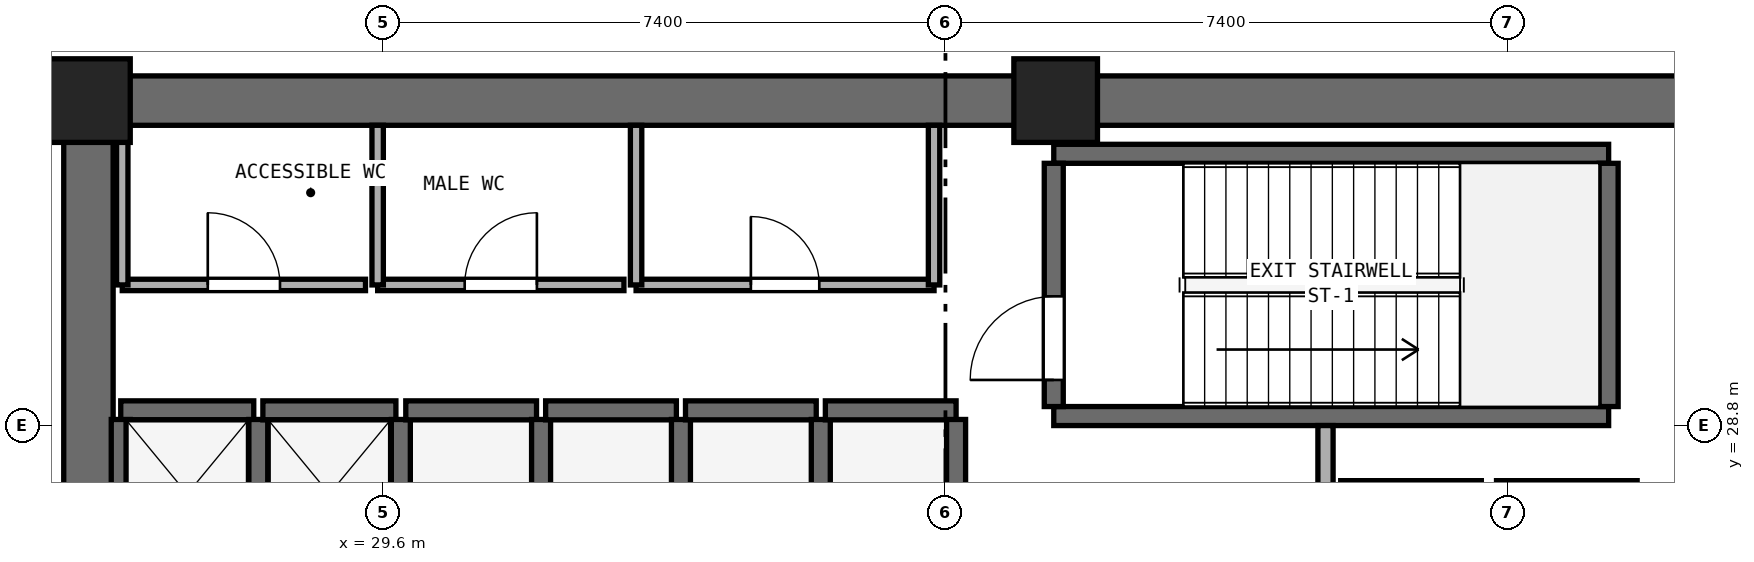
"""IFC4 building model, lengths in metres.
Left out: names, types, materials, properties, quantities, classifications, styles, units other than length and angle.
Written with IfcOpenShell. Run it as: python <this file> out.ifc"""

import sys

from ifc_helpers import new_model, si_unit, direction, frame, frame_2d, origin, origin_2d, place, context, subcontext, project, spatial, rectangle, extrude, element, fill, save


model = new_model("IFC4")
c1 = context("Model", 3, precision=1e-05, world=origin(), true_north=direction((0.0, 1.0)))
c2 = subcontext(c1, "Body", "Model", "MODEL_VIEW")
j1 = project(units=[si_unit("LENGTHUNIT", "METRE"), si_unit("PLANEANGLEUNIT", "RADIAN")], contexts=[c1])
p1 = place(None, origin())
s1 = spatial("IfcSite", under=j1, at=p1, CompositionType="ELEMENT")
p2 = place(p1, origin())
s2 = spatial("IfcBuilding", under=s1, at=p2, CompositionType="ELEMENT")
p3 = place(p2, frame((0.0, 0.0, 10.0)))
s3 = spatial("IfcBuildingStorey", under=s2, at=p3, CompositionType="ELEMENT", Elevation=10.0)
p4 = place(p3, frame((25.4, 33.075, 0.0), z_axis=(0.0, 0.0, 1.0), x_axis=(1.0, 0.0, 0.0)))
e1 = element("IfcWall", 1, at=p4, inside=s3, PredefinedType="SHEAR", context=c2, shape_type="SweptSolid", body=[
    extrude(rectangle(XDim=23.2, YDim=0.65, at=frame_2d((11.6, 0.0))), origin(), (0.0, 0.0, 1.0), 4.68),
])
p5 = place(p3, frame((25.725, 17.65, 0.0), z_axis=(0.0, 0.0, 1.0), x_axis=(0.0, 1.0, 0.0)))
e2 = element("IfcWall", 2, at=p5, inside=s3, PredefinedType="SHEAR", context=c2, shape_type="SweptSolid", body=[
    extrude(rectangle(XDim=15.1, YDim=0.65, at=frame_2d((7.55, 0.0))), origin(), (0.0, 0.0, 1.0), 4.68),
])
p6 = place(p5, frame((6.8, 0.0, 0.0)))
e3 = element("IfcOpeningElement", 3, at=p6, cuts=e2, PredefinedType="OPENING", context=c2, shape_type="SweptSolid", body=[
    extrude(rectangle(XDim=1.5, YDim=2.15, at=frame_2d((0.75, 1.075))), frame((0.0, 0.335, 0.0), z_axis=(0.0, -1.0, 0.0), x_axis=(1.0, 0.0, 0.0)), (0.0, 0.0, 1.0), 0.67),
])
for number, where, z_axis, x_axis in (
    (4, (38.45, 33.075, 0.0), (0.0, 0.0, 1.0), (1.0, 0.0, 0.0)),
    (5, (25.725, 33.075, 0.0), (0.0, 0.0, 1.0), (1.0, 0.0, 0.0)),
):
    element("IfcColumn", number, at=place(p3, frame(where, z_axis=z_axis, x_axis=x_axis)), inside=s3, PredefinedType="PILASTER", context=c2, shape_type="SweptSolid", body=[
        extrude(rectangle(XDim=1.1, YDim=1.1, at=origin_2d()), origin(), (0.0, 0.0, 1.0), 5.0),
    ])
for number, where, z_axis, x_axis in (
    (6, (38.425, 28.925, 0.0), (0.0, 0.0, 1.0), (1.0, 0.0, 0.0)),
    (7, (38.425, 32.375, 0.0), (0.0, 0.0, 1.0), (1.0, 0.0, 0.0)),
):
    element("IfcWall", number, at=place(p3, frame(where, z_axis=z_axis, x_axis=x_axis)), inside=s3, PredefinedType="SHEAR", context=c2, shape_type="SweptSolid", body=[
        extrude(rectangle(XDim=7.3, YDim=0.25, at=frame_2d((3.65, 0.0))), origin(), (0.0, 0.0, 1.0), 4.68),
    ])
p7 = place(p3, frame((38.425, 29.05, 0.0), z_axis=(0.0, 0.0, 1.0), x_axis=(0.0, 1.0, 0.0)))
e8 = element("IfcWall", 8, at=p7, inside=s3, PredefinedType="SHEAR", context=c2, shape_type="SweptSolid", body=[
    extrude(rectangle(XDim=3.2, YDim=0.25, at=frame_2d((1.6, 0.0))), origin(), (0.0, 0.0, 1.0), 4.68),
])
p8 = place(p7, frame((0.35, 0.0, 0.0)))
e9 = element("IfcOpeningElement", 9, at=p8, cuts=e8, PredefinedType="OPENING", context=c2, shape_type="SweptSolid", body=[
    extrude(rectangle(XDim=1.1, YDim=2.15, at=frame_2d((0.55, 1.075))), frame((0.0, 0.135, 0.0), z_axis=(0.0, -1.0, 0.0), x_axis=(1.0, 0.0, 0.0)), (0.0, 0.0, 1.0), 0.27),
])
p9 = place(p3, frame((45.725, 29.05, 0.0), z_axis=(0.0, 0.0, 1.0), x_axis=(0.0, 1.0, 0.0)))
e10 = element("IfcWall", 10, at=p9, inside=s3, PredefinedType="SHEAR", context=c2, shape_type="SweptSolid", body=[
    extrude(rectangle(XDim=3.2, YDim=0.25, at=frame_2d((1.6, 0.0))), origin(), (0.0, 0.0, 1.0), 4.68),
])
p10 = place(p3, frame((26.15, 29.0, 0.0), z_axis=(0.0, 0.0, 1.0), x_axis=(1.0, 0.0, 0.0)))
e11 = element("IfcWall", 11, at=p10, inside=s3, PredefinedType="SHEAR", context=c2, shape_type="SweptSolid", body=[
    extrude(rectangle(XDim=1.75, YDim=0.25, at=frame_2d((0.875, 0.0))), origin(), (0.0, 0.0, 1.0), 4.68),
])
for number, where, z_axis, x_axis in (
    (12, (26.15, 26.92, 0.0), (0.0, 0.0, 1.0), (0.0, 1.0, 0.0)),
    (13, (27.96, 26.92, 0.0), (0.0, 0.0, 1.0), (0.0, 1.0, 0.0)),
):
    element("IfcWall", number, at=place(p3, frame(where, z_axis=z_axis, x_axis=x_axis)), inside=s3, PredefinedType="SHEAR", context=c2, shape_type="SweptSolid", body=[
        extrude(rectangle(XDim=1.96, YDim=0.25, at=frame_2d((0.98, 0.0))), origin(), (0.0, 0.0, 1.0), 4.68),
    ])
p11 = place(p3, frame((28.02, 29.0, 0.0), z_axis=(0.0, 0.0, 1.0), x_axis=(1.0, 0.0, 0.0)))
e14 = element("IfcWall", 14, at=p11, inside=s3, PredefinedType="SHEAR", context=c2, shape_type="SweptSolid", body=[
    extrude(rectangle(XDim=1.75, YDim=0.25, at=frame_2d((0.875, 0.0))), origin(), (0.0, 0.0, 1.0), 4.68),
])
p12 = place(p3, frame((29.835, 26.92, 0.0), z_axis=(0.0, 0.0, 1.0), x_axis=(0.0, 1.0, 0.0)))
e15 = element("IfcWall", 15, at=p12, inside=s3, PredefinedType="SHEAR", context=c2, shape_type="SweptSolid", body=[
    extrude(rectangle(XDim=1.96, YDim=0.25, at=frame_2d((0.98, 0.0))), origin(), (0.0, 0.0, 1.0), 4.68),
])
p13 = place(p3, frame((29.9, 29.0, 0.0), z_axis=(0.0, 0.0, 1.0), x_axis=(1.0, 0.0, 0.0)))
e16 = element("IfcWall", 16, at=p13, inside=s3, PredefinedType="SHEAR", context=c2, shape_type="SweptSolid", body=[
    extrude(rectangle(XDim=1.72, YDim=0.25, at=frame_2d((0.86, 0.0))), origin(), (0.0, 0.0, 1.0), 4.68),
])
p14 = place(p3, frame((31.68, 26.92, 0.0), z_axis=(0.0, 0.0, 1.0), x_axis=(0.0, 1.0, 0.0)))
e17 = element("IfcWall", 17, at=p14, inside=s3, PredefinedType="SHEAR", context=c2, shape_type="SweptSolid", body=[
    extrude(rectangle(XDim=1.96, YDim=0.25, at=frame_2d((0.98, 0.0))), origin(), (0.0, 0.0, 1.0), 4.68),
])
p15 = place(p3, frame((31.74, 29.0, 0.0), z_axis=(0.0, 0.0, 1.0), x_axis=(1.0, 0.0, 0.0)))
e18 = element("IfcWall", 18, at=p15, inside=s3, PredefinedType="SHEAR", context=c2, shape_type="SweptSolid", body=[
    extrude(rectangle(XDim=1.72, YDim=0.25, at=frame_2d((0.86, 0.0))), origin(), (0.0, 0.0, 1.0), 4.68),
])
p16 = place(p3, frame((33.52, 26.92, 0.0), z_axis=(0.0, 0.0, 1.0), x_axis=(0.0, 1.0, 0.0)))
e19 = element("IfcWall", 19, at=p16, inside=s3, PredefinedType="SHEAR", context=c2, shape_type="SweptSolid", body=[
    extrude(rectangle(XDim=1.96, YDim=0.25, at=frame_2d((0.98, 0.0))), origin(), (0.0, 0.0, 1.0), 4.68),
])
p17 = place(p3, frame((33.58, 29.0, 0.0), z_axis=(0.0, 0.0, 1.0), x_axis=(1.0, 0.0, 0.0)))
e20 = element("IfcWall", 20, at=p17, inside=s3, PredefinedType="SHEAR", context=c2, shape_type="SweptSolid", body=[
    extrude(rectangle(XDim=1.72, YDim=0.25, at=frame_2d((0.86, 0.0))), origin(), (0.0, 0.0, 1.0), 4.68),
])
p18 = place(p3, frame((35.36, 26.92, 0.0), z_axis=(0.0, 0.0, 1.0), x_axis=(0.0, 1.0, 0.0)))
e21 = element("IfcWall", 21, at=p18, inside=s3, PredefinedType="SHEAR", context=c2, shape_type="SweptSolid", body=[
    extrude(rectangle(XDim=1.96, YDim=0.25, at=frame_2d((0.98, 0.0))), origin(), (0.0, 0.0, 1.0), 4.68),
])
p19 = place(p3, frame((35.42, 29.0, 0.0), z_axis=(0.0, 0.0, 1.0), x_axis=(1.0, 0.0, 0.0)))
e22 = element("IfcWall", 22, at=p19, inside=s3, PredefinedType="SHEAR", context=c2, shape_type="SweptSolid", body=[
    extrude(rectangle(XDim=1.72, YDim=0.25, at=frame_2d((0.86, 0.0))), origin(), (0.0, 0.0, 1.0), 4.68),
])
p20 = place(p3, frame((37.14, 26.92, 0.0), z_axis=(0.0, 0.0, 1.0), x_axis=(0.0, 1.0, 0.0)))
e23 = element("IfcWall", 23, at=p20, inside=s3, PredefinedType="SHEAR", context=c2, shape_type="SweptSolid", body=[
    extrude(rectangle(XDim=1.96, YDim=0.25, at=frame_2d((0.98, 0.0))), origin(), (0.0, 0.0, 1.0), 4.68),
])
for number, where, z_axis, x_axis in (
    (24, (42.2, 27.95, 0.0), (0.0, 0.0, 1.0), (1.0, 0.0, 0.0)),
    (25, (44.25, 27.95, 0.0), (0.0, 0.0, 1.0), (1.0, 0.0, 0.0)),
):
    element("IfcWall", number, at=place(p3, frame(where, z_axis=z_axis, x_axis=x_axis)), inside=s3, PredefinedType="SHEAR", context=c2, shape_type="SweptSolid", body=[
        extrude(rectangle(XDim=1.85, YDim=0.25, at=frame_2d((0.925, 0.0))), origin(), (0.0, 0.0, 1.0), 4.68),
    ])
p21 = place(p3, frame((42.0, 22.75, 0.0), z_axis=(0.0, 0.0, 1.0), x_axis=(0.0, 1.0, 0.0)))
e26 = element("IfcWall", 26, at=p21, inside=s3, PredefinedType="SOLIDWALL", context=c2, shape_type="SweptSolid", body=[
    extrude(rectangle(XDim=6.05, YDim=0.2, at=frame_2d((3.025, 0.0))), origin(), (0.0, 0.0, 1.0), 4.68),
])
p22 = place(p21, frame((0.65, 0.0, 0.0)))
e27 = element("IfcOpeningElement", 27, at=p22, cuts=e26, PredefinedType="OPENING", context=c2, shape_type="SweptSolid", body=[
    extrude(rectangle(XDim=1.2, YDim=2.15, at=frame_2d((0.6, 1.075))), frame((0.0, 0.11, 0.0), z_axis=(0.0, -1.0, 0.0), x_axis=(1.0, 0.0, 0.0)), (0.0, 0.0, 1.0), 0.22),
])
p23 = place(p3, frame((26.17, 30.65, 0.0), z_axis=(0.0, 0.0, 1.0), x_axis=(1.0, 0.0, 0.0)))
e28 = element("IfcWall", 28, at=p23, inside=s3, PredefinedType="PARTITIONING", context=c2, shape_type="SweptSolid", body=[
    extrude(rectangle(XDim=3.2, YDim=0.15, at=frame_2d((1.6, 0.0))), origin(), (0.0, 0.0, 1.0), 4.68),
])
p24 = place(p23, frame((1.125, 0.0, 0.0)))
e29 = element("IfcOpeningElement", 29, at=p24, cuts=e28, PredefinedType="OPENING", context=c2, shape_type="SweptSolid", body=[
    extrude(rectangle(XDim=0.95, YDim=2.1, at=frame_2d((0.475, 1.05))), frame((0.0, 0.085, 0.0), z_axis=(0.0, -1.0, 0.0), x_axis=(1.0, 0.0, 0.0)), (0.0, 0.0, 1.0), 0.17),
])
p25 = place(p3, frame((26.17, 30.65, 0.0), z_axis=(0.0, 0.0, 1.0), x_axis=(0.0, 1.0, 0.0)))
e30 = element("IfcWall", 30, at=p25, inside=s3, PredefinedType="PARTITIONING", context=c2, shape_type="SweptSolid", body=[
    extrude(rectangle(XDim=2.1, YDim=0.15, at=frame_2d((1.05, 0.0))), origin(), (0.0, 0.0, 1.0), 4.68),
])
p26 = place(p3, frame((29.53, 30.65, 0.0), z_axis=(0.0, 0.0, 1.0), x_axis=(1.0, 0.0, 0.0)))
e31 = element("IfcWall", 31, at=p26, inside=s3, PredefinedType="PARTITIONING", context=c2, shape_type="SweptSolid", body=[
    extrude(rectangle(XDim=3.24, YDim=0.15, at=frame_2d((1.62, 0.0))), origin(), (0.0, 0.0, 1.0), 4.68),
])
p27 = place(p26, frame((1.145, 0.0, 0.0)))
e32 = element("IfcOpeningElement", 32, at=p27, cuts=e31, PredefinedType="OPENING", context=c2, shape_type="SweptSolid", body=[
    extrude(rectangle(XDim=0.95, YDim=2.1, at=frame_2d((0.475, 1.05))), frame((0.0, 0.085, 0.0), z_axis=(0.0, -1.0, 0.0), x_axis=(1.0, 0.0, 0.0)), (0.0, 0.0, 1.0), 0.17),
])
p28 = place(p3, frame((29.53, 30.65, 0.0), z_axis=(0.0, 0.0, 1.0), x_axis=(0.0, 1.0, 0.0)))
e33 = element("IfcWall", 33, at=p28, inside=s3, PredefinedType="PARTITIONING", context=c2, shape_type="SweptSolid", body=[
    extrude(rectangle(XDim=2.1, YDim=0.15, at=frame_2d((1.05, 0.0))), origin(), (0.0, 0.0, 1.0), 4.68),
])
p29 = place(p3, frame((32.93, 30.65, 0.0), z_axis=(0.0, 0.0, 1.0), x_axis=(1.0, 0.0, 0.0)))
e34 = element("IfcWall", 34, at=p29, inside=s3, PredefinedType="PARTITIONING", context=c2, shape_type="SweptSolid", body=[
    extrude(rectangle(XDim=3.92, YDim=0.15, at=frame_2d((1.96, 0.0))), origin(), (0.0, 0.0, 1.0), 4.68),
])
p30 = place(p29, frame((1.51, 0.0, 0.0)))
e35 = element("IfcOpeningElement", 35, at=p30, cuts=e34, PredefinedType="OPENING", context=c2, shape_type="SweptSolid", body=[
    extrude(rectangle(XDim=0.9, YDim=2.1, at=frame_2d((0.45, 1.05))), frame((0.0, 0.085, 0.0), z_axis=(0.0, -1.0, 0.0), x_axis=(1.0, 0.0, 0.0)), (0.0, 0.0, 1.0), 0.17),
])
for number, where, z_axis, x_axis in (
    (36, (32.93, 30.65, 0.0), (0.0, 0.0, 1.0), (0.0, 1.0, 0.0)),
    (37, (36.85, 30.65, 0.0), (0.0, 0.0, 1.0), (0.0, 1.0, 0.0)),
):
    element("IfcWall", number, at=place(p3, frame(where, z_axis=z_axis, x_axis=x_axis)), inside=s3, PredefinedType="PARTITIONING", context=c2, shape_type="SweptSolid", body=[
        extrude(rectangle(XDim=2.1, YDim=0.15, at=frame_2d((1.05, 0.0))), origin(), (0.0, 0.0, 1.0), 4.68),
    ])
p31 = place(p8, origin())
e38 = element("IfcDoor", 38, at=p31, inside=s3, OperationType="SINGLE_SWING_LEFT", PredefinedType="DOOR", context=c2, shape_type="SweptSolid", body=[
    extrude(rectangle(XDim=1.1, YDim=2.15, at=frame_2d((0.55, 1.075))), frame((0.0, 0.025, 0.0), z_axis=(0.0, -1.0, 0.0), x_axis=(1.0, 0.0, 0.0)), (0.0, 0.0, 1.0), 0.05),
])
fill(e9, e38)
p32 = place(p24, origin())
e39 = element("IfcDoor", 39, at=p32, inside=s3, OperationType="SINGLE_SWING_LEFT", PredefinedType="DOOR", context=c2, shape_type="SweptSolid", body=[
    extrude(rectangle(XDim=0.95, YDim=2.1, at=frame_2d((0.475, 1.05))), frame((0.0, 0.025, 0.0), z_axis=(0.0, -1.0, 0.0), x_axis=(1.0, 0.0, 0.0)), (0.0, 0.0, 1.0), 0.05),
])
fill(e29, e39)
p33 = place(p27, origin())
e40 = element("IfcDoor", 40, at=p33, inside=s3, OperationType="SINGLE_SWING_RIGHT", PredefinedType="DOOR", context=c2, shape_type="SweptSolid", body=[
    extrude(rectangle(XDim=0.95, YDim=2.1, at=frame_2d((0.475, 1.05))), frame((0.0, 0.025, 0.0), z_axis=(0.0, -1.0, 0.0), x_axis=(1.0, 0.0, 0.0)), (0.0, 0.0, 1.0), 0.05),
])
fill(e32, e40)
p34 = place(p30, origin())
e41 = element("IfcDoor", 41, at=p34, inside=s3, OperationType="SINGLE_SWING_LEFT", PredefinedType="DOOR", context=c2, shape_type="SweptSolid", body=[
    extrude(rectangle(XDim=0.9, YDim=2.1, at=frame_2d((0.45, 1.05))), frame((0.0, 0.025, 0.0), z_axis=(0.0, -1.0, 0.0), x_axis=(1.0, 0.0, 0.0)), (0.0, 0.0, 1.0), 0.05),
])
fill(e35, e41)
save(model, sys.argv[1])
